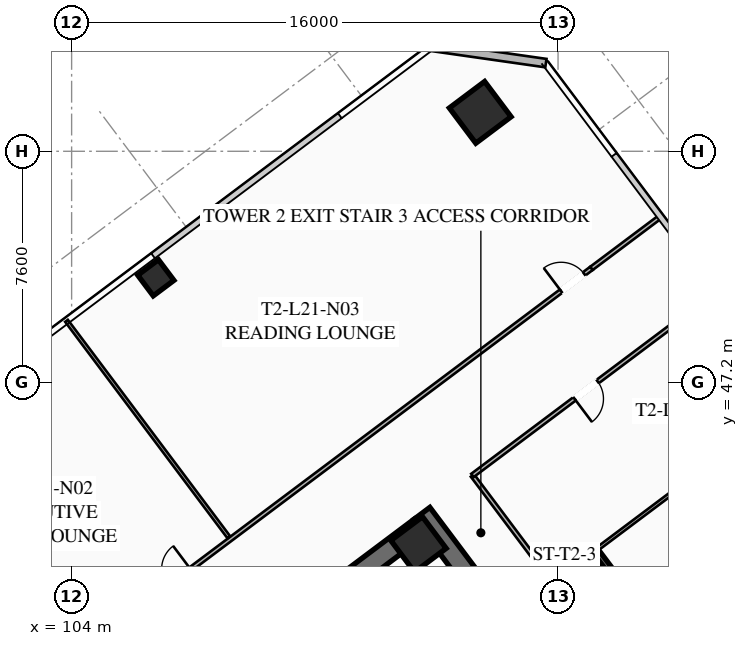
"""IFC4 building model, lengths in metres.
Left out: names, types, materials, properties, quantities, classifications, styles, units other than length and angle.
Written with IfcOpenShell. Run it as: python <this file> out.ifc"""

import sys

from ifc_helpers import new_model, si_unit, direction, frame, frame_2d, origin, origin_2d, place, context, subcontext, project, spatial, rectangle, hollow_rectangle, extrude, element, fill, save


model = new_model("IFC4")
c1 = context("Model", 3, precision=1e-05, world=origin(), true_north=direction((0.0, 1.0)))
c2 = subcontext(c1, "Body", "Model", "MODEL_VIEW")
j1 = project(units=[si_unit("LENGTHUNIT", "METRE"), si_unit("PLANEANGLEUNIT", "RADIAN")], contexts=[c1])
p1 = place(None, origin())
s1 = spatial("IfcSite", under=j1, at=p1, CompositionType="ELEMENT")
p2 = place(p1, origin())
s2 = spatial("IfcBuilding", under=s1, at=p2, CompositionType="ELEMENT")
p3 = place(p2, frame((0.0, 0.0, 81.4)))
s3 = spatial("IfcBuildingStorey", under=s2, at=p3, CompositionType="ELEMENT", Elevation=81.4)
p4 = place(p3, frame((115.524, 42.893, 0.0), z_axis=(0.0, 0.0, 1.0), x_axis=(0.600005007985, -0.799996243986, 0.0)))
e1 = element("IfcWall", 1, at=p4, inside=s3, PredefinedType="SHEAR", context=c2, shape_type="SweptSolid", body=[
    extrude(rectangle(XDim=15.6, YDim=0.65, at=frame_2d((7.8, 0.0))), origin(), (0.0, 0.0, 1.0), 3.55),
])
p5 = place(p3, frame((103.571, 33.522, 0.0), z_axis=(0.0, 0.0, 1.0), x_axis=(0.799998028465, 0.600002628705, 0.0)))
e2 = element("IfcWall", 2, at=p5, inside=s3, PredefinedType="SHEAR", context=c2, shape_type="SweptSolid", body=[
    extrude(rectangle(XDim=14.86, YDim=0.65, at=frame_2d((7.43, 0.0))), origin(), (0.0, 0.0, 1.0), 3.55),
])
p6 = place(p5, frame((4.48, 0.0, 0.0)))
e3 = element("IfcOpeningElement", 3, at=p6, cuts=e2, PredefinedType="OPENING", context=c2, shape_type="SweptSolid", body=[
    extrude(rectangle(XDim=1.25, YDim=2.25, at=frame_2d((0.625, 1.125))), frame((0.0, 0.335, 0.0), z_axis=(0.0, -1.0, 0.0), x_axis=(1.0, 0.0, 0.0)), (0.0, 0.0, 1.0), 0.67),
])
p7 = place(p5, frame((9.53, 0.0, 0.0)))
e4 = element("IfcOpeningElement", 4, at=p7, cuts=e2, PredefinedType="OPENING", context=c2, shape_type="SweptSolid", body=[
    extrude(rectangle(XDim=1.25, YDim=2.25, at=frame_2d((0.625, 1.125))), frame((0.0, 0.335, 0.0), z_axis=(0.0, -1.0, 0.0), x_axis=(1.0, 0.0, 0.0)), (0.0, 0.0, 1.0), 0.67),
])
p8 = place(p3, frame((115.41, 41.87, 0.0), z_axis=(0.0, 0.0, 1.0), x_axis=(0.799999996291, 0.600000004945, 0.0)))
e5 = element("IfcColumn", 5, at=p8, inside=s3, PredefinedType="COLUMN", context=c2, shape_type="SweptSolid", body=[
    extrude(hollow_rectangle(XDim=1.3, YDim=1.3, WallThickness=0.05, at=origin_2d()), origin(), (0.0, 0.0, 1.0), 3.35),
])
p9 = place(p3, frame((117.44, 56.08, 0.0), z_axis=(0.0, 0.0, 1.0), x_axis=(0.799999996291, 0.600000004945, 0.0)))
e6 = element("IfcColumn", 6, at=p9, inside=s3, PredefinedType="COLUMN", context=c2, shape_type="SweptSolid", body=[
    extrude(hollow_rectangle(XDim=1.45, YDim=1.45, WallThickness=0.055, at=origin_2d()), origin(), (0.0, 0.0, 1.0), 3.35),
])
p10 = place(p3, frame((106.77, 50.64, 0.0), z_axis=(0.0, 0.0, 1.0), x_axis=(0.799999996291, 0.600000004945, 0.0)))
e7 = element("IfcColumn", 7, at=p10, inside=s3, PredefinedType="COLUMN", context=c2, shape_type="SweptSolid", body=[
    extrude(hollow_rectangle(XDim=0.85, YDim=0.85, WallThickness=0.035, at=origin_2d()), origin(), (0.0, 0.0, 1.0), 3.35),
])
p11 = place(p3, frame((115.82, 58.24, 0.0), z_axis=(0.0, 0.0, 1.0), x_axis=(0.989948214866, -0.141430307517, 0.0)))
e8 = element("IfcWall", 8, at=p11, inside=s3, PredefinedType="SOLIDWALL", context=c2, shape_type="SweptSolid", body=[
    extrude(rectangle(XDim=3.818, YDim=0.28, at=frame_2d((1.909, 0.0))), origin(), (0.0, 0.0, 1.0), 3.35),
])
p12 = place(p3, frame((125.304, 36.228, 0.0), z_axis=(0.0, 0.0, 1.0), x_axis=(-0.59998851072, 0.800008616831, 0.0)))
e9 = element("IfcWall", 9, at=p12, inside=s3, PredefinedType="SHEAR", context=c2, shape_type="SweptSolid", body=[
    extrude(rectangle(XDim=6.8, YDim=0.2, at=frame_2d((3.4, 0.0))), origin(), (0.0, 0.0, 1.0), 3.35),
])
p13 = place(p3, frame((121.204, 41.528, 0.0), z_axis=(0.0, 0.0, 1.0), x_axis=(-0.800017232136, -0.599977023131, 0.0)))
e10 = element("IfcWall", 10, at=p13, inside=s3, PredefinedType="SHEAR", context=c2, shape_type="SweptSolid", body=[
    extrude(rectangle(XDim=3.4, YDim=0.2, at=frame_2d((1.7, 0.0))), origin(), (0.0, 0.0, 1.0), 3.35),
])
p14 = place(p13, frame((1.975, 0.0, 0.0)))
e11 = element("IfcOpeningElement", 11, at=p14, cuts=e10, PredefinedType="OPENING", context=c2, shape_type="SweptSolid", body=[
    extrude(rectangle(XDim=1.15, YDim=2.2, at=frame_2d((0.575, 1.1))), frame((0.0, 0.11, 0.0), z_axis=(0.0, -1.0, 0.0), x_axis=(1.0, 0.0, 0.0)), (0.0, 0.0, 1.0), 0.22),
])
p15 = place(p3, frame((119.824, 40.618, 0.0), z_axis=(0.0, 0.0, 1.0), x_axis=(-0.599982243973, 0.800013316712, 0.0)))
e12 = element("IfcWall", 12, at=p15, inside=s3, PredefinedType="PARTITIONING", context=c2, shape_type="SweptSolid", body=[
    extrude(rectangle(XDim=4.4, YDim=0.135, at=frame_2d((2.2, 0.0))), origin(), (0.0, 0.0, 1.0), 2.703),
])
p16 = place(p3, frame((98.516, 34.012, 0.0), z_axis=(0.0, 0.0, 1.0), x_axis=(0.8, 0.6, 0.0)))
e13 = element("IfcWall", 13, at=p16, inside=s3, PredefinedType="PARTITIONING", context=c2, shape_type="SweptSolid", body=[
    extrude(rectangle(XDim=28.23, YDim=0.135, at=frame_2d((14.115, 0.0))), origin(), (0.0, 0.0, 1.0), 2.703),
])
p17 = place(p16, frame((0.3, 0.0, 0.0)))
e14 = element("IfcOpeningElement", 14, at=p17, cuts=e13, PredefinedType="OPENING", context=c2, shape_type="SweptSolid", body=[
    extrude(rectangle(XDim=0.95, YDim=2.05, at=frame_2d((0.475, 1.025))), frame((0.0, 0.077, 0.0), z_axis=(0.0, -1.0, 0.0), x_axis=(1.0, 0.0, 0.0)), (0.0, 0.0, 1.0), 0.155),
])
p18 = place(p16, frame((10.792, 0.0, 0.0)))
e15 = element("IfcOpeningElement", 15, at=p18, cuts=e13, PredefinedType="OPENING", context=c2, shape_type="SweptSolid", body=[
    extrude(rectangle(XDim=0.95, YDim=2.05, at=frame_2d((0.475, 1.025))), frame((0.0, 0.077, 0.0), z_axis=(0.0, -1.0, 0.0), x_axis=(1.0, 0.0, 0.0)), (0.0, 0.0, 1.0), 0.155),
])
p19 = place(p16, frame((26.98, 0.0, 0.0)))
e16 = element("IfcOpeningElement", 16, at=p19, cuts=e13, PredefinedType="OPENING", context=c2, shape_type="SweptSolid", body=[
    extrude(rectangle(XDim=0.95, YDim=2.05, at=frame_2d((0.475, 1.025))), frame((0.0, 0.077, 0.0), z_axis=(0.0, -1.0, 0.0), x_axis=(1.0, 0.0, 0.0)), (0.0, 0.0, 1.0), 0.155),
])
p20 = place(p3, frame((121.1, 50.95, 0.0), z_axis=(0.0, 0.0, 1.0), x_axis=(0.799989647378, 0.600013803248, 0.0)))
e17 = element("IfcWall", 17, at=p20, inside=s3, PredefinedType="PARTITIONING", context=c2, shape_type="SweptSolid", body=[
    extrude(rectangle(XDim=2.83, YDim=0.135, at=frame_2d((1.415, 0.0))), origin(), (0.0, 0.0, 1.0), 2.703),
])
p21 = place(p3, frame((109.172, 42.104, 0.0), z_axis=(0.0, 0.0, 1.0), x_axis=(-0.6, 0.8, 0.0)))
e18 = element("IfcWall", 18, at=p21, inside=s3, PredefinedType="PARTITIONING", context=c2, shape_type="SweptSolid", body=[
    extrude(rectangle(XDim=8.9, YDim=0.11, at=frame_2d((4.45, 0.0))), origin(), (0.0, 0.0, 1.0), 2.703),
])
p22 = place(p3, frame((125.224, 50.168, 0.0), z_axis=(0.0, 0.0, 1.0), x_axis=(-0.8, -0.6, 0.0)))
e19 = element("IfcWall", 19, at=p22, inside=s3, PredefinedType="PARTITIONING", context=c2, shape_type="SweptSolid", body=[
    extrude(rectangle(XDim=10.05, YDim=0.135, at=frame_2d((5.025, 0.0))), origin(), (0.0, 0.0, 1.0), 2.703),
])
p23 = place(p22, frame((4.9, 0.0, 0.0)))
e20 = element("IfcOpeningElement", 20, at=p23, cuts=e19, PredefinedType="OPENING", context=c2, shape_type="SweptSolid", body=[
    extrude(rectangle(XDim=0.95, YDim=2.05, at=frame_2d((0.475, 1.025))), frame((0.0, 0.077, 0.0), z_axis=(0.0, -1.0, 0.0), x_axis=(1.0, 0.0, 0.0)), (0.0, 0.0, 1.0), 0.155),
])
p24 = place(p3, frame((127.864, 46.648, 0.0), z_axis=(0.0, 0.0, 1.0), x_axis=(-0.800007145523, -0.599990472518, 0.0)))
e21 = element("IfcWall", 21, at=p24, inside=s3, PredefinedType="PARTITIONING", context=c2, shape_type="SweptSolid", body=[
    extrude(rectangle(XDim=8.2, YDim=0.11, at=frame_2d((4.1, 0.0))), origin(), (0.0, 0.0, 1.0), 2.703),
])
p25 = place(p19, origin())
e22 = element("IfcDoor", 22, at=p25, inside=s3, OperationType="SINGLE_SWING_LEFT", PredefinedType="DOOR", context=c2, shape_type="SweptSolid", body=[
    extrude(rectangle(XDim=0.95, YDim=2.05, at=frame_2d((0.475, 1.025))), frame((0.0, 0.025, 0.0), z_axis=(0.0, -1.0, 0.0), x_axis=(1.0, 0.0, 0.0)), (0.0, 0.0, 1.0), 0.05),
])
fill(e16, e22)
p26 = place(p23, origin())
e23 = element("IfcDoor", 23, at=p26, inside=s3, OperationType="SINGLE_SWING_RIGHT", PredefinedType="DOOR", context=c2, shape_type="SweptSolid", body=[
    extrude(rectangle(XDim=0.95, YDim=2.05, at=frame_2d((0.475, 1.025))), frame((0.0, 0.025, 0.0), z_axis=(0.0, -1.0, 0.0), x_axis=(1.0, 0.0, 0.0)), (0.0, 0.0, 1.0), 0.05),
])
fill(e20, e23)
save(model, sys.argv[1])
